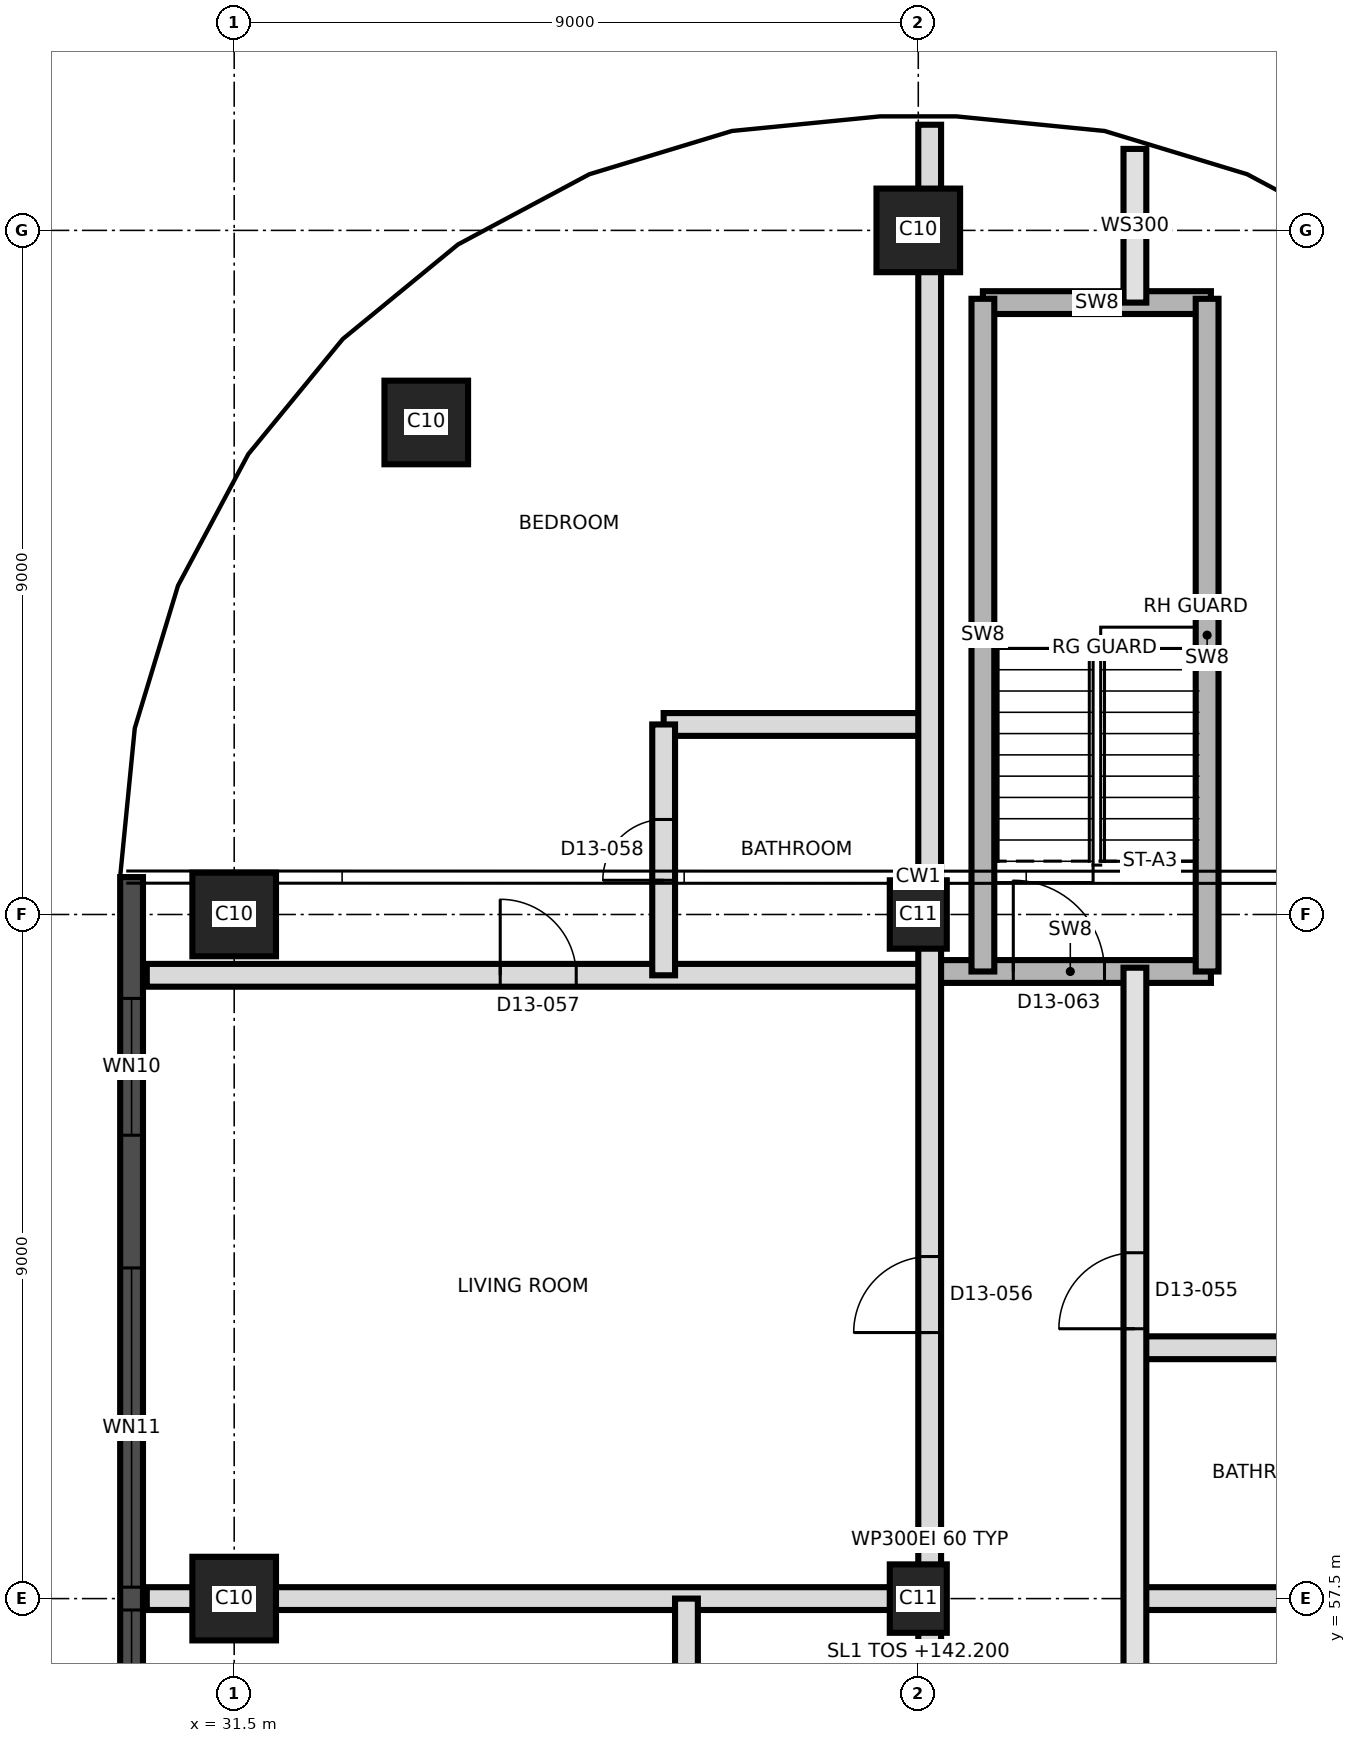
"""IFC4 building model, lengths in metres.
Left out: names, types, materials, properties, quantities, classifications, styles, units other than length and angle.
Written with IfcOpenShell. Run it as: python <this file> out.ifc"""

import sys

from ifc_helpers import new_model, si_unit, direction, frame, frame_2d, origin, origin_2d, place, context, subcontext, project, spatial, rectangle, extrude, element, fill, save


model = new_model("IFC4")
c1 = context("Model", 3, precision=1e-05, world=origin(), true_north=direction((0.0, 1.0)))
c2 = subcontext(c1, "Body", "Model", "MODEL_VIEW")
j1 = project(units=[si_unit("LENGTHUNIT", "METRE"), si_unit("PLANEANGLEUNIT", "RADIAN")], contexts=[c1])
p1 = place(None, origin())
s1 = spatial("IfcSite", under=j1, at=p1, CompositionType="ELEMENT")
p2 = place(p1, origin())
s2 = spatial("IfcBuilding", under=s1, at=p2, CompositionType="ELEMENT")
p3 = place(p2, frame((0.0, 0.0, 142.2)))
s3 = spatial("IfcBuildingStorey", under=s2, at=p3, CompositionType="ELEMENT", Elevation=142.2)
p4 = place(p3, frame((31.5, 57.5, 0.0), z_axis=(0.0, 0.0, 1.0), x_axis=(1.0, 0.0, 0.0)))
e1 = element("IfcColumn", 1, at=p4, inside=s3, PredefinedType="COLUMN", context=c2, shape_type="SweptSolid", body=[
    extrude(rectangle(XDim=1.1, YDim=1.1, at=origin_2d()), origin(), (0.0, 0.0, 1.0), 3.7),
])
p5 = place(p3, frame((40.5, 57.5, 0.0), z_axis=(0.0, 0.0, 1.0), x_axis=(0.0, 1.0, 0.0)))
e2 = element("IfcColumn", 2, at=p5, inside=s3, PredefinedType="COLUMN", context=c2, shape_type="SweptSolid", body=[
    extrude(rectangle(XDim=0.9, YDim=0.75, at=origin_2d()), origin(), (0.0, 0.0, 1.0), 3.7),
])
p6 = place(p3, frame((31.5, 66.5, 0.0), z_axis=(0.0, 0.0, 1.0), x_axis=(1.0, 0.0, 0.0)))
e3 = element("IfcColumn", 3, at=p6, inside=s3, PredefinedType="COLUMN", context=c2, shape_type="SweptSolid", body=[
    extrude(rectangle(XDim=1.1, YDim=1.1, at=origin_2d()), origin(), (0.0, 0.0, 1.0), 3.7),
])
p7 = place(p3, frame((40.5, 66.5, 0.0), z_axis=(0.0, 0.0, 1.0), x_axis=(0.0, 1.0, 0.0)))
e4 = element("IfcColumn", 4, at=p7, inside=s3, PredefinedType="COLUMN", context=c2, shape_type="SweptSolid", body=[
    extrude(rectangle(XDim=0.9, YDim=0.75, at=origin_2d()), origin(), (0.0, 0.0, 1.0), 3.7),
])
for number, where, z_axis, x_axis in (
    (5, (34.027, 72.973, 0.0), (0.0, 0.0, 1.0), (1.0, 0.0, 0.0)),
    (6, (40.5, 75.5, 0.0), (0.0, 0.0, 1.0), (1.0, 0.0, 0.0)),
):
    element("IfcColumn", number, at=place(p3, frame(where, z_axis=z_axis, x_axis=x_axis)), inside=s3, PredefinedType="COLUMN", context=c2, shape_type="SweptSolid", body=[
        extrude(rectangle(XDim=1.1, YDim=1.1, at=origin_2d()), origin(), (0.0, 0.0, 1.0), 3.7),
    ])
p8 = place(p3, frame((30.15, 66.992, 0.0), z_axis=(0.0, 0.0, 1.0), x_axis=(0.0, -1.0, 0.0)))
e7 = element("IfcWall", 7, at=p8, inside=s3, PredefinedType="SOLIDWALL", context=c2, shape_type="SweptSolid", body=[
    extrude(rectangle(XDim=32.968, YDim=0.3, at=frame_2d((16.484, 0.0))), origin(), (0.0, 0.0, 1.0), 3.4),
])
p9 = place(p8, frame((1.596, 0.0, 0.3)))
e8 = element("IfcOpeningElement", 8, at=p9, cuts=e7, PredefinedType="OPENING", context=c2, shape_type="SweptSolid", body=[
    extrude(rectangle(XDim=1.8, YDim=2.4, at=frame_2d((0.9, 1.2))), frame((0.0, 0.16, 0.0), z_axis=(0.0, -1.0, 0.0), x_axis=(1.0, 0.0, 0.0)), (0.0, 0.0, 1.0), 0.32),
])
p10 = place(p8, frame((5.142, 0.0, 0.9)))
e9 = element("IfcOpeningElement", 9, at=p10, cuts=e7, PredefinedType="OPENING", context=c2, shape_type="SweptSolid", body=[
    extrude(rectangle(XDim=4.2, YDim=1.5, at=frame_2d((2.1, 0.75))), frame((0.0, 0.16, 0.0), z_axis=(0.0, -1.0, 0.0), x_axis=(1.0, 0.0, 0.0)), (0.0, 0.0, 1.0), 0.32),
])
p11 = place(p8, frame((9.642, 0.0, 0.9)))
e10 = element("IfcOpeningElement", 10, at=p11, cuts=e7, PredefinedType="OPENING", context=c2, shape_type="SweptSolid", body=[
    extrude(rectangle(XDim=4.2, YDim=1.5, at=frame_2d((2.1, 0.75))), frame((0.0, 0.16, 0.0), z_axis=(0.0, -1.0, 0.0), x_axis=(1.0, 0.0, 0.0)), (0.0, 0.0, 1.0), 0.32),
])
p12 = place(p8, frame((14.142, 0.0, 0.9)))
e11 = element("IfcOpeningElement", 11, at=p12, cuts=e7, PredefinedType="OPENING", context=c2, shape_type="SweptSolid", body=[
    extrude(rectangle(XDim=4.2, YDim=1.5, at=frame_2d((2.1, 0.75))), frame((0.0, 0.16, 0.0), z_axis=(0.0, -1.0, 0.0), x_axis=(1.0, 0.0, 0.0)), (0.0, 0.0, 1.0), 0.32),
])
p13 = place(p8, frame((18.642, 0.0, 0.9)))
e12 = element("IfcOpeningElement", 12, at=p13, cuts=e7, PredefinedType="OPENING", context=c2, shape_type="SweptSolid", body=[
    extrude(rectangle(XDim=4.2, YDim=1.5, at=frame_2d((2.1, 0.75))), frame((0.0, 0.16, 0.0), z_axis=(0.0, -1.0, 0.0), x_axis=(1.0, 0.0, 0.0)), (0.0, 0.0, 1.0), 0.32),
])
p14 = place(p8, frame((23.142, 0.0, 0.9)))
e13 = element("IfcOpeningElement", 13, at=p14, cuts=e7, PredefinedType="OPENING", context=c2, shape_type="SweptSolid", body=[
    extrude(rectangle(XDim=4.2, YDim=1.5, at=frame_2d((2.1, 0.75))), frame((0.0, 0.16, 0.0), z_axis=(0.0, -1.0, 0.0), x_axis=(1.0, 0.0, 0.0)), (0.0, 0.0, 1.0), 0.32),
])
p15 = place(p8, frame((29.33, 0.0, 0.3)))
e14 = element("IfcOpeningElement", 14, at=p15, cuts=e7, PredefinedType="OPENING", context=c2, shape_type="SweptSolid", body=[
    extrude(rectangle(XDim=1.8, YDim=2.4, at=frame_2d((0.9, 1.2))), frame((0.0, 0.16, 0.0), z_axis=(0.0, -1.0, 0.0), x_axis=(1.0, 0.0, 0.0)), (0.0, 0.0, 1.0), 0.32),
])
p16 = place(p3, frame((30.35, 57.5, 0.0), z_axis=(0.0, 0.0, 1.0), x_axis=(1.0, 0.0, 0.0)))
e15 = element("IfcWall", 15, at=p16, inside=s3, PredefinedType="PARTITIONING", context=c2, shape_type="SweptSolid", body=[
    extrude(rectangle(XDim=10.3, YDim=0.3, at=frame_2d((5.15, 0.0))), origin(), (0.0, 0.0, 1.0), 3.4),
])
p17 = place(p3, frame((43.35, 57.5, 0.0), z_axis=(0.0, 0.0, 1.0), x_axis=(1.0, 0.0, 0.0)))
e16 = element("IfcWall", 16, at=p17, inside=s3, PredefinedType="PARTITIONING", context=c2, shape_type="SweptSolid", body=[
    extrude(rectangle(XDim=7.48, YDim=0.3, at=frame_2d((3.74, 0.0))), origin(), (0.0, 0.0, 1.0), 3.4),
])
p18 = place(p3, frame((43.35, 60.8, 0.0), z_axis=(0.0, 0.0, 1.0), x_axis=(1.0, 0.0, 0.0)))
e17 = element("IfcWall", 17, at=p18, inside=s3, PredefinedType="PARTITIONING", context=c2, shape_type="SweptSolid", body=[
    extrude(rectangle(XDim=3.5, YDim=0.3, at=frame_2d((1.75, 0.0))), origin(), (0.0, 0.0, 1.0), 3.4),
])
p19 = place(p3, frame((30.35, 65.7, 0.0), z_axis=(0.0, 0.0, 1.0), x_axis=(1.0, 0.0, 0.0)))
e18 = element("IfcWall", 18, at=p19, inside=s3, PredefinedType="PARTITIONING", context=c2, shape_type="SweptSolid", body=[
    extrude(rectangle(XDim=10.3, YDim=0.3, at=frame_2d((5.15, 0.0))), origin(), (0.0, 0.0, 1.0), 3.4),
])
p20 = place(p19, frame((4.65, 0.0, 0.0)))
e19 = element("IfcOpeningElement", 19, at=p20, cuts=e18, PredefinedType="OPENING", context=c2, shape_type="SweptSolid", body=[
    extrude(rectangle(XDim=1.0, YDim=2.1, at=frame_2d((0.5, 1.05))), frame((0.0, 0.16, 0.0), z_axis=(0.0, -1.0, 0.0), x_axis=(1.0, 0.0, 0.0)), (0.0, 0.0, 1.0), 0.32),
])
p21 = place(p3, frame((40.65, 65.75, 0.0), z_axis=(0.0, 0.0, 1.0), x_axis=(1.0, 0.0, 0.0)))
e20 = element("IfcWall", 20, at=p21, inside=s3, PredefinedType="SHEAR", context=c2, shape_type="SweptSolid", body=[
    extrude(rectangle(XDim=3.7, YDim=0.3, at=frame_2d((1.85, 0.0))), origin(), (0.0, 0.0, 1.0), 3.4),
])
p22 = place(p21, frame((1.1, 0.0, 0.0)))
e21 = element("IfcOpeningElement", 21, at=p22, cuts=e20, PredefinedType="OPENING", context=c2, shape_type="SweptSolid", body=[
    extrude(rectangle(XDim=1.2, YDim=2.1, at=frame_2d((0.6, 1.05))), frame((0.0, 0.16, 0.0), z_axis=(0.0, -1.0, 0.0), x_axis=(1.0, 0.0, 0.0)), (0.0, 0.0, 1.0), 0.32),
])
p23 = place(p3, frame((37.15, 69.0, 0.0), z_axis=(0.0, 0.0, 1.0), x_axis=(1.0, 0.0, 0.0)))
e22 = element("IfcWall", 22, at=p23, inside=s3, PredefinedType="PARTITIONING", context=c2, shape_type="SweptSolid", body=[
    extrude(rectangle(XDim=3.5, YDim=0.3, at=frame_2d((1.75, 0.0))), origin(), (0.0, 0.0, 1.0), 3.4),
])
p24 = place(p3, frame((41.35, 74.55, 0.0), z_axis=(0.0, 0.0, 1.0), x_axis=(1.0, 0.0, 0.0)))
e23 = element("IfcWall", 23, at=p24, inside=s3, PredefinedType="SHEAR", context=c2, shape_type="SweptSolid", body=[
    extrude(rectangle(XDim=3.0, YDim=0.3, at=frame_2d((1.5, 0.0))), origin(), (0.0, 0.0, 1.0), 3.4),
])
p25 = place(p3, frame((37.15, 65.7, 0.0), z_axis=(0.0, 0.0, 1.0), x_axis=(0.0, 1.0, 0.0)))
e24 = element("IfcWall", 24, at=p25, inside=s3, PredefinedType="PARTITIONING", context=c2, shape_type="SweptSolid", body=[
    extrude(rectangle(XDim=3.3, YDim=0.3, at=frame_2d((1.65, 0.0))), origin(), (0.0, 0.0, 1.0), 3.4),
])
p26 = place(p25, frame((1.25, 0.0, 0.0)))
e25 = element("IfcOpeningElement", 25, at=p26, cuts=e24, PredefinedType="OPENING", context=c2, shape_type="SweptSolid", body=[
    extrude(rectangle(XDim=0.8, YDim=2.1, at=frame_2d((0.4, 1.05))), frame((0.0, 0.16, 0.0), z_axis=(0.0, -1.0, 0.0), x_axis=(1.0, 0.0, 0.0)), (0.0, 0.0, 1.0), 0.32),
])
p27 = place(p3, frame((37.45, 54.8, 0.0), z_axis=(0.0, 0.0, 1.0), x_axis=(0.0, 1.0, 0.0)))
e26 = element("IfcWall", 26, at=p27, inside=s3, PredefinedType="PARTITIONING", context=c2, shape_type="SweptSolid", body=[
    extrude(rectangle(XDim=2.7, YDim=0.3, at=frame_2d((1.35, 0.0))), origin(), (0.0, 0.0, 1.0), 3.4),
])
p28 = place(p27, frame((0.95, 0.0, 0.0)))
e27 = element("IfcOpeningElement", 27, at=p28, cuts=e26, PredefinedType="OPENING", context=c2, shape_type="SweptSolid", body=[
    extrude(rectangle(XDim=0.8, YDim=2.1, at=frame_2d((0.4, 1.05))), frame((0.0, 0.16, 0.0), z_axis=(0.0, -1.0, 0.0), x_axis=(1.0, 0.0, 0.0)), (0.0, 0.0, 1.0), 0.32),
])
p29 = place(p3, frame((40.65, 39.65, 0.0), z_axis=(0.0, 0.0, 1.0), x_axis=(0.0, 1.0, 0.0)))
e28 = element("IfcWall", 28, at=p29, inside=s3, PredefinedType="PARTITIONING", context=c2, shape_type="SweptSolid", body=[
    extrude(rectangle(XDim=37.24, YDim=0.3, at=frame_2d((18.62, 0.0))), origin(), (0.0, 0.0, 1.0), 3.4),
])
p30 = place(p29, frame((0.52, 0.0, 0.0)))
e29 = element("IfcOpeningElement", 29, at=p30, cuts=e28, PredefinedType="OPENING", context=c2, shape_type="SweptSolid", body=[
    extrude(rectangle(XDim=1.0, YDim=2.1, at=frame_2d((0.5, 1.05))), frame((0.0, 0.16, 0.0), z_axis=(0.0, -1.0, 0.0), x_axis=(1.0, 0.0, 0.0)), (0.0, 0.0, 1.0), 0.32),
])
p31 = place(p29, frame((6.37, 0.0, 0.0)))
e30 = element("IfcOpeningElement", 30, at=p31, cuts=e28, PredefinedType="OPENING", context=c2, shape_type="SweptSolid", body=[
    extrude(rectangle(XDim=1.0, YDim=2.1, at=frame_2d((0.5, 1.05))), frame((0.0, 0.16, 0.0), z_axis=(0.0, -1.0, 0.0), x_axis=(1.0, 0.0, 0.0)), (0.0, 0.0, 1.0), 0.32),
])
p32 = place(p29, frame((9.985, 0.0, 0.0)))
e31 = element("IfcOpeningElement", 31, at=p32, cuts=e28, PredefinedType="OPENING", context=c2, shape_type="SweptSolid", body=[
    extrude(rectangle(XDim=1.2, YDim=2.1, at=frame_2d((0.6, 1.05))), frame((0.0, 0.16, 0.0), z_axis=(0.0, -1.0, 0.0), x_axis=(1.0, 0.0, 0.0)), (0.0, 0.0, 1.0), 0.32),
])
p33 = place(p29, frame((13.235, 0.0, 0.0)))
e32 = element("IfcOpeningElement", 32, at=p33, cuts=e28, PredefinedType="OPENING", context=c2, shape_type="SweptSolid", body=[
    extrude(rectangle(XDim=1.0, YDim=2.1, at=frame_2d((0.5, 1.05))), frame((0.0, 0.16, 0.0), z_axis=(0.0, -1.0, 0.0), x_axis=(1.0, 0.0, 0.0)), (0.0, 0.0, 1.0), 0.32),
])
p34 = place(p29, frame((21.35, 0.0, 0.0)))
e33 = element("IfcOpeningElement", 33, at=p34, cuts=e28, PredefinedType="OPENING", context=c2, shape_type="SweptSolid", body=[
    extrude(rectangle(XDim=1.0, YDim=2.4, at=frame_2d((0.5, 1.2))), frame((0.0, 0.16, 0.0), z_axis=(0.0, -1.0, 0.0), x_axis=(1.0, 0.0, 0.0)), (0.0, 0.0, 1.0), 0.32),
])
p35 = place(p3, frame((41.35, 65.75, 0.0), z_axis=(0.0, 0.0, 1.0), x_axis=(0.0, 1.0, 0.0)))
e34 = element("IfcWall", 34, at=p35, inside=s3, PredefinedType="SHEAR", context=c2, shape_type="SweptSolid", body=[
    extrude(rectangle(XDim=8.85, YDim=0.3, at=frame_2d((4.425, 0.0))), origin(), (0.0, 0.0, 1.0), 3.4),
])
p36 = place(p3, frame((43.35, 39.65, 0.0), z_axis=(0.0, 0.0, 1.0), x_axis=(0.0, 1.0, 0.0)))
e35 = element("IfcWall", 35, at=p36, inside=s3, PredefinedType="SOLIDWALL", context=c2, shape_type="SweptSolid", body=[
    extrude(rectangle(XDim=26.15, YDim=0.3, at=frame_2d((13.075, 0.0))), origin(), (0.0, 0.0, 1.0), 3.4),
])
p37 = place(p36, frame((0.985, 0.0, 0.0)))
e36 = element("IfcOpeningElement", 36, at=p37, cuts=e35, PredefinedType="OPENING", context=c2, shape_type="SweptSolid", body=[
    extrude(rectangle(XDim=1.2, YDim=2.1, at=frame_2d((0.6, 1.05))), frame((0.0, 0.16, 0.0), z_axis=(0.0, -1.0, 0.0), x_axis=(1.0, 0.0, 0.0)), (0.0, 0.0, 1.0), 0.32),
])
p38 = place(p36, frame((4.235, 0.0, 0.0)))
e37 = element("IfcOpeningElement", 37, at=p38, cuts=e35, PredefinedType="OPENING", context=c2, shape_type="SweptSolid", body=[
    extrude(rectangle(XDim=1.0, YDim=2.1, at=frame_2d((0.5, 1.05))), frame((0.0, 0.16, 0.0), z_axis=(0.0, -1.0, 0.0), x_axis=(1.0, 0.0, 0.0)), (0.0, 0.0, 1.0), 0.32),
])
p39 = place(p36, frame((14.5, 0.0, 0.0)))
e38 = element("IfcOpeningElement", 38, at=p39, cuts=e35, PredefinedType="OPENING", context=c2, shape_type="SweptSolid", body=[
    extrude(rectangle(XDim=1.0, YDim=2.4, at=frame_2d((0.5, 1.2))), frame((0.0, 0.16, 0.0), z_axis=(0.0, -1.0, 0.0), x_axis=(1.0, 0.0, 0.0)), (0.0, 0.0, 1.0), 0.32),
])
p40 = place(p36, frame((21.4, 0.0, 0.0)))
e39 = element("IfcOpeningElement", 39, at=p40, cuts=e35, PredefinedType="OPENING", context=c2, shape_type="SweptSolid", body=[
    extrude(rectangle(XDim=1.0, YDim=2.4, at=frame_2d((0.5, 1.2))), frame((0.0, 0.16, 0.0), z_axis=(0.0, -1.0, 0.0), x_axis=(1.0, 0.0, 0.0)), (0.0, 0.0, 1.0), 0.32),
])
p41 = place(p3, frame((43.35, 74.55, 0.0), z_axis=(0.0, 0.0, 1.0), x_axis=(0.0, 1.0, 0.0)))
e40 = element("IfcWall", 40, at=p41, inside=s3, PredefinedType="SOLIDWALL", context=c2, shape_type="SweptSolid", body=[
    extrude(rectangle(XDim=2.022, YDim=0.3, at=frame_2d((1.011, 0.0))), origin(), (0.0, 0.0, 1.0), 3.4),
])
p42 = place(p3, frame((44.3, 65.75, 0.0), z_axis=(0.0, 0.0, 1.0), x_axis=(0.0, 1.0, 0.0)))
e41 = element("IfcWall", 41, at=p42, inside=s3, PredefinedType="SHEAR", context=c2, shape_type="SweptSolid", body=[
    extrude(rectangle(XDim=8.85, YDim=0.3, at=frame_2d((4.425, 0.0))), origin(), (0.0, 0.0, 1.0), 3.4),
])
p43 = place(p9, origin())
e42 = element("IfcWindow", 42, at=p43, inside=s3, PartitioningType="SINGLE_PANEL", PredefinedType="WINDOW", context=c2, shape_type="SweptSolid", body=[
    extrude(rectangle(XDim=1.8, YDim=2.4, at=frame_2d((0.9, 1.2))), frame((0.0, 0.03, 0.0), z_axis=(0.0, -1.0, 0.0), x_axis=(1.0, 0.0, 0.0)), (0.0, 0.0, 1.0), 0.06),
])
fill(e8, e42)
p44 = place(p10, origin())
e43 = element("IfcWindow", 43, at=p44, inside=s3, PartitioningType="SINGLE_PANEL", PredefinedType="WINDOW", context=c2, shape_type="SweptSolid", body=[
    extrude(rectangle(XDim=4.2, YDim=1.5, at=frame_2d((2.1, 0.75))), frame((0.0, 0.03, 0.0), z_axis=(0.0, -1.0, 0.0), x_axis=(1.0, 0.0, 0.0)), (0.0, 0.0, 1.0), 0.06),
])
fill(e9, e43)
p45 = place(p11, origin())
e44 = element("IfcWindow", 44, at=p45, inside=s3, PartitioningType="SINGLE_PANEL", PredefinedType="WINDOW", context=c2, shape_type="SweptSolid", body=[
    extrude(rectangle(XDim=4.2, YDim=1.5, at=frame_2d((2.1, 0.75))), frame((0.0, 0.03, 0.0), z_axis=(0.0, -1.0, 0.0), x_axis=(1.0, 0.0, 0.0)), (0.0, 0.0, 1.0), 0.06),
])
fill(e10, e44)
p46 = place(p40, origin())
e45 = element("IfcDoor", 45, at=p46, inside=s3, OperationType="SINGLE_SWING_LEFT", PredefinedType="DOOR", context=c2, shape_type="SweptSolid", body=[
    extrude(rectangle(XDim=1.0, YDim=2.4, at=frame_2d((0.5, 1.2))), frame((0.0, 0.025, 0.0), z_axis=(0.0, -1.0, 0.0), x_axis=(1.0, 0.0, 0.0)), (0.0, 0.0, 1.0), 0.05),
])
fill(e39, e45)
p47 = place(p34, origin())
e46 = element("IfcDoor", 46, at=p47, inside=s3, OperationType="SINGLE_SWING_LEFT", PredefinedType="DOOR", context=c2, shape_type="SweptSolid", body=[
    extrude(rectangle(XDim=1.0, YDim=2.4, at=frame_2d((0.5, 1.2))), frame((0.0, 0.025, 0.0), z_axis=(0.0, -1.0, 0.0), x_axis=(1.0, 0.0, 0.0)), (0.0, 0.0, 1.0), 0.05),
])
fill(e33, e46)
p48 = place(p20, origin())
e47 = element("IfcDoor", 47, at=p48, inside=s3, OperationType="SINGLE_SWING_LEFT", PredefinedType="DOOR", context=c2, shape_type="SweptSolid", body=[
    extrude(rectangle(XDim=1.0, YDim=2.1, at=frame_2d((0.5, 1.05))), frame((0.0, 0.025, 0.0), z_axis=(0.0, -1.0, 0.0), x_axis=(1.0, 0.0, 0.0)), (0.0, 0.0, 1.0), 0.05),
])
fill(e19, e47)
p49 = place(p26, origin())
e48 = element("IfcDoor", 48, at=p49, inside=s3, OperationType="SINGLE_SWING_RIGHT", PredefinedType="DOOR", context=c2, shape_type="SweptSolid", body=[
    extrude(rectangle(XDim=0.8, YDim=2.1, at=frame_2d((0.4, 1.05))), frame((0.0, 0.025, 0.0), z_axis=(0.0, -1.0, 0.0), x_axis=(1.0, 0.0, 0.0)), (0.0, 0.0, 1.0), 0.05),
])
fill(e25, e48)
p50 = place(p22, origin())
e49 = element("IfcDoor", 49, at=p50, inside=s3, OperationType="SINGLE_SWING_RIGHT", PredefinedType="DOOR", context=c2, shape_type="SweptSolid", body=[
    extrude(rectangle(XDim=1.2, YDim=2.1, at=frame_2d((0.6, 1.05))), frame((0.0, 0.025, 0.0), z_axis=(0.0, -1.0, 0.0), x_axis=(1.0, 0.0, 0.0)), (0.0, 0.0, 1.0), 0.05),
])
fill(e21, e49)
save(model, sys.argv[1])
